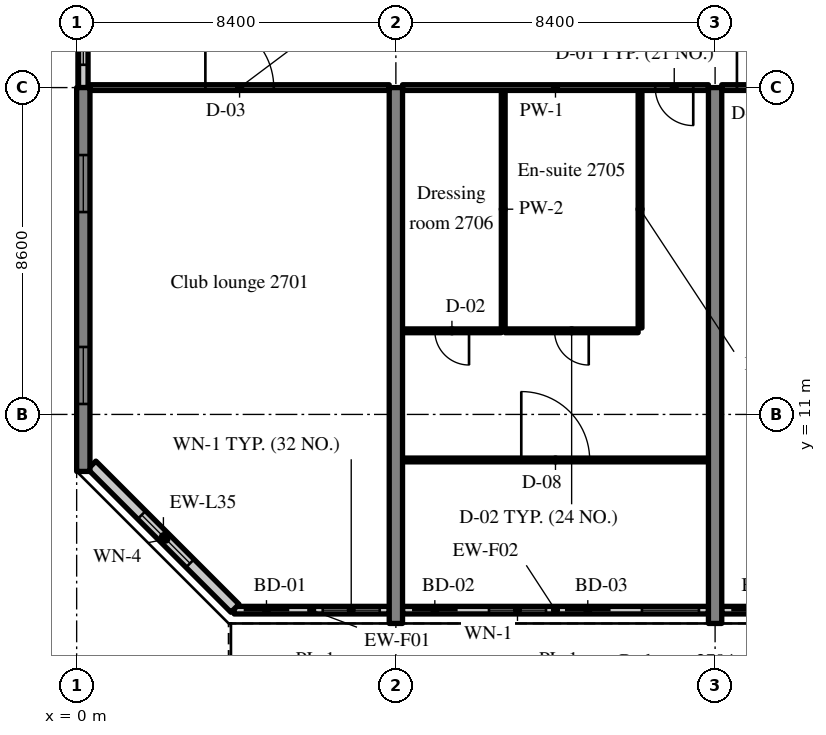
"""IFC4 building model, lengths in metres.
Left out: names, types, materials, properties, quantities, classifications, styles, units other than length and angle.
Written with IfcOpenShell. Run it as: python <this file> out.ifc"""

import sys

from ifc_helpers import new_model, si_unit, direction, frame, frame_2d, origin, place, context, subcontext, project, spatial, rectangle, extrude, source, transform, mapped, element, fill, save


model = new_model("IFC4")
c1 = context("Model", 3, precision=1e-05, world=origin(), true_north=direction((0.0, 1.0)))
c2 = subcontext(c1, "Body", "Model", "MODEL_VIEW")
j1 = project(units=[si_unit("LENGTHUNIT", "METRE"), si_unit("PLANEANGLEUNIT", "RADIAN")], contexts=[c1])
p1 = place(None, origin())
s1 = spatial("IfcSite", under=j1, at=p1, CompositionType="ELEMENT")
p2 = place(p1, origin())
s2 = spatial("IfcBuilding", under=s1, at=p2, CompositionType="ELEMENT")
p3 = place(p2, frame((0.0, 0.0, 114.2)))
s3 = spatial("IfcBuildingStorey", under=s2, at=p3, CompositionType="ELEMENT", Elevation=114.2)
m1 = source(origin(), c2, "Body", "SweptSolid", [
    extrude(rectangle(XDim=10.1, YDim=0.35, at=frame_2d((5.05, 0.0))), origin(), (0.0, 0.0, 1.0), 3.52),
])
p4 = place(p3, frame((0.175, 9.5, 0.0), z_axis=(0.0, 0.0, 1.0), x_axis=(0.0, 1.0, 0.0)))
e1 = element("IfcWall", 1, at=p4, inside=s3, PredefinedType="SHEAR", context=c2, shape_type="MappedRepresentation", body=[
    mapped(m1, transform((0.0, 0.0, 0.0), scale=1.0)),
])
m2 = source(origin(), c2, "Body", "SweptSolid", [
    extrude(rectangle(XDim=1.5, YDim=1.5, at=frame_2d((0.75, 0.75))), frame((0.0, 0.185, 0.0), z_axis=(0.0, -1.0, 0.0), x_axis=(1.0, 0.0, 0.0)), (0.0, 0.0, 1.0), 0.37),
])
p5 = place(p4, frame((1.775, 0.0, 0.9)))
e2 = element("IfcOpeningElement", 2, at=p5, cuts=e1, PredefinedType="OPENING", context=c2, shape_type="MappedRepresentation", body=[
    mapped(m2, transform((0.0, 0.0, 0.0), scale=1.0)),
])
p6 = place(p4, frame((6.825, 0.0, 0.9)))
e3 = element("IfcOpeningElement", 3, at=p6, cuts=e1, PredefinedType="OPENING", context=c2, shape_type="MappedRepresentation", body=[
    mapped(m2, transform((0.0, 0.0, 0.0), scale=1.0)),
])
m3 = source(origin(), c2, "Body", "SweptSolid", [
    extrude(rectangle(XDim=14.1, YDim=0.35, at=frame_2d((7.05, 0.0))), origin(), (0.0, 0.0, 1.0), 3.52),
])
for number, where, z_axis, x_axis in (
    (4, (8.4, 5.5, 0.0), (0.0, 0.0, 1.0), (0.0, 1.0, 0.0)),
    (5, (16.8, 5.5, 0.0), (0.0, 0.0, 1.0), (0.0, 1.0, 0.0)),
):
    element("IfcWall", number, at=place(p3, frame(where, z_axis=z_axis, x_axis=x_axis)), inside=s3, PredefinedType="SHEAR", context=c2, shape_type="MappedRepresentation", body=[
        mapped(m3, transform((0.0, 0.0, 0.0), scale=1.0)),
    ])
m4 = source(origin(), c2, "Body", "SweptSolid", [
    extrude(rectangle(XDim=4.08, YDim=0.2, at=frame_2d((2.04, 0.0))), origin(), (0.0, 0.0, 1.0), 2.82),
])
p7 = place(p3, frame((4.145, 5.85, 0.0), z_axis=(0.0, 0.0, 1.0), x_axis=(1.0, 0.0, 0.0)))
e6 = element("IfcWall", 6, at=p7, inside=s3, PredefinedType="SOLIDWALL", context=c2, shape_type="MappedRepresentation", body=[
    mapped(m4, transform((0.0, 0.0, 0.0), scale=1.0)),
])
m5 = source(origin(), c2, "Body", "SweptSolid", [
    extrude(rectangle(XDim=1.2, YDim=2.4, at=frame_2d((0.6, 1.2))), frame((0.0, 0.11, 0.0), z_axis=(0.0, -1.0, 0.0), x_axis=(1.0, 0.0, 0.0)), (0.0, 0.0, 1.0), 0.22),
])
p8 = place(p7, frame((0.25, 0.0, 0.0)))
e7 = element("IfcOpeningElement", 7, at=p8, cuts=e6, PredefinedType="OPENING", context=c2, shape_type="MappedRepresentation", body=[
    mapped(m5, transform((0.0, 0.0, 0.0), scale=1.0)),
])
m6 = source(origin(), c2, "Body", "SweptSolid", [
    extrude(rectangle(XDim=1.5, YDim=1.5, at=frame_2d((0.75, 0.75))), frame((0.0, 0.11, 0.0), z_axis=(0.0, -1.0, 0.0), x_axis=(1.0, 0.0, 0.0)), (0.0, 0.0, 1.0), 0.22),
])
p9 = place(p7, frame((2.33, 0.0, 0.9)))
e8 = element("IfcOpeningElement", 8, at=p9, cuts=e6, PredefinedType="OPENING", context=c2, shape_type="MappedRepresentation", body=[
    mapped(m6, transform((0.0, 0.0, 0.0), scale=1.0)),
])
m7 = source(origin(), c2, "Body", "SweptSolid", [
    extrude(rectangle(XDim=8.05, YDim=0.2, at=frame_2d((4.025, 0.0))), origin(), (0.0, 0.0, 1.0), 2.82),
])
p10 = place(p3, frame((8.575, 5.85, 0.0), z_axis=(0.0, 0.0, 1.0), x_axis=(1.0, 0.0, 0.0)))
e9 = element("IfcWall", 9, at=p10, inside=s3, PredefinedType="SOLIDWALL", context=c2, shape_type="MappedRepresentation", body=[
    mapped(m7, transform((0.0, 0.0, 0.0), scale=1.0)),
])
p11 = place(p10, frame((0.25, 0.0, 0.0)))
e10 = element("IfcOpeningElement", 10, at=p11, cuts=e9, PredefinedType="OPENING", context=c2, shape_type="MappedRepresentation", body=[
    mapped(m5, transform((0.0, 0.0, 0.0), scale=1.0)),
])
p12 = place(p10, frame((2.275, 0.0, 0.9)))
e11 = element("IfcOpeningElement", 11, at=p12, cuts=e9, PredefinedType="OPENING", context=c2, shape_type="MappedRepresentation", body=[
    mapped(m6, transform((0.0, 0.0, 0.0), scale=1.0)),
])
p13 = place(p10, frame((4.275, 0.0, 0.0)))
e12 = element("IfcOpeningElement", 12, at=p13, cuts=e9, PredefinedType="OPENING", context=c2, shape_type="MappedRepresentation", body=[
    mapped(m5, transform((0.0, 0.0, 0.0), scale=1.0)),
])
p14 = place(p10, frame((6.3, 0.0, 0.9)))
e13 = element("IfcOpeningElement", 13, at=p14, cuts=e9, PredefinedType="OPENING", context=c2, shape_type="MappedRepresentation", body=[
    mapped(m6, transform((0.0, 0.0, 0.0), scale=1.0)),
])
m8 = source(origin(), c2, "Body", "SweptSolid", [
    extrude(rectangle(XDim=8.05, YDim=0.2, at=frame_2d((4.025, 0.0))), origin(), (0.0, 0.0, 1.0), 2.82),
])
p15 = place(p3, frame((16.975, 5.85, 0.0), z_axis=(0.0, 0.0, 1.0), x_axis=(1.0, 0.0, 0.0)))
e14 = element("IfcWall", 14, at=p15, inside=s3, PredefinedType="SOLIDWALL", context=c2, shape_type="MappedRepresentation", body=[
    mapped(m8, transform((0.0, 0.0, 0.0), scale=1.0)),
])
p16 = place(p15, frame((0.25, 0.0, 0.0)))
e15 = element("IfcOpeningElement", 15, at=p16, cuts=e14, PredefinedType="OPENING", context=c2, shape_type="MappedRepresentation", body=[
    mapped(m5, transform((0.0, 0.0, 0.0), scale=1.0)),
])
p17 = place(p15, frame((2.275, 0.0, 0.9)))
e16 = element("IfcOpeningElement", 16, at=p17, cuts=e14, PredefinedType="OPENING", context=c2, shape_type="MappedRepresentation", body=[
    mapped(m6, transform((0.0, 0.0, 0.0), scale=1.0)),
])
p18 = place(p15, frame((4.275, 0.0, 0.0)))
e17 = element("IfcOpeningElement", 17, at=p18, cuts=e14, PredefinedType="OPENING", context=c2, shape_type="MappedRepresentation", body=[
    mapped(m5, transform((0.0, 0.0, 0.0), scale=1.0)),
])
p19 = place(p15, frame((6.3, 0.0, 0.9)))
e18 = element("IfcOpeningElement", 18, at=p19, cuts=e14, PredefinedType="OPENING", context=c2, shape_type="MappedRepresentation", body=[
    mapped(m6, transform((0.0, 0.0, 0.0), scale=1.0)),
])
m9 = source(origin(), c2, "Body", "SweptSolid", [
    extrude(rectangle(XDim=5.326, YDim=0.3, at=frame_2d((2.663, 0.0))), origin(), (0.0, 0.0, 1.0), 3.52),
])
p20 = place(p3, frame((0.4, 9.666, 0.0), z_axis=(0.0, 0.0, 1.0), x_axis=(0.707106781187, -0.707106781187, 0.0)))
e19 = element("IfcWall", 19, at=p20, inside=s3, PredefinedType="SOLIDWALL", context=c2, shape_type="MappedRepresentation", body=[
    mapped(m9, transform((0.0, 0.0, 0.0), scale=1.0)),
])
m10 = source(origin(), c2, "Body", "SweptSolid", [
    extrude(rectangle(XDim=1.8, YDim=1.5, at=frame_2d((0.9, 0.75))), frame((0.0, 0.16, 0.0), z_axis=(0.0, -1.0, 0.0), x_axis=(1.0, 0.0, 0.0)), (0.0, 0.0, 1.0), 0.32),
])
p21 = place(p20, frame((1.854, 0.0, 0.9)))
e20 = element("IfcOpeningElement", 20, at=p21, cuts=e19, PredefinedType="OPENING", context=c2, shape_type="MappedRepresentation", body=[
    mapped(m10, transform((0.0, 0.0, 0.0), scale=1.0)),
])
m11 = source(origin(), c2, "Body", "SweptSolid", [
    extrude(rectangle(XDim=2.4, YDim=0.25, at=frame_2d((1.2, 0.0))), origin(), (0.0, 0.0, 1.0), 2.62),
])
p22 = place(p3, frame((0.175, 19.6, 0.0), z_axis=(0.0, 0.0, 1.0), x_axis=(0.0, 1.0, 0.0)))
e21 = element("IfcWall", 21, at=p22, inside=s3, PredefinedType="SOLIDWALL", context=c2, shape_type="MappedRepresentation", body=[
    mapped(m11, transform((0.0, 0.0, 0.0), scale=1.0)),
])
m12 = source(origin(), c2, "Body", "SweptSolid", [
    extrude(rectangle(XDim=1.2, YDim=1.5, at=frame_2d((0.6, 0.75))), frame((0.0, 0.135, 0.0), z_axis=(0.0, -1.0, 0.0), x_axis=(1.0, 0.0, 0.0)), (0.0, 0.0, 1.0), 0.27),
])
p23 = place(p22, frame((0.6, 0.0, 0.9)))
e22 = element("IfcOpeningElement", 22, at=p23, cuts=e21, PredefinedType="OPENING", context=c2, shape_type="MappedRepresentation", body=[
    mapped(m12, transform((0.0, 0.0, 0.0), scale=1.0)),
])
m13 = source(origin(), c2, "Body", "SweptSolid", [
    extrude(rectangle(XDim=7.875, YDim=0.15, at=frame_2d((3.938, 0.0))), origin(), (0.0, 0.0, 1.0), 2.82),
])
p24 = place(p3, frame((0.35, 19.6, 0.0), z_axis=(0.0, 0.0, 1.0), x_axis=(1.0, 0.0, 0.0)))
e23 = element("IfcWall", 23, at=p24, inside=s3, PredefinedType="PARTITIONING", context=c2, shape_type="MappedRepresentation", body=[
    mapped(m13, transform((0.0, 0.0, 0.0), scale=1.0)),
])
m14 = source(origin(), c2, "Body", "SweptSolid", [
    extrude(rectangle(XDim=1.8, YDim=2.1, at=frame_2d((0.9, 1.05))), frame((0.0, 0.085, 0.0), z_axis=(0.0, -1.0, 0.0), x_axis=(1.0, 0.0, 0.0)), (0.0, 0.0, 1.0), 0.17),
])
p25 = place(p24, frame((3.037, 0.0, 0.0)))
e24 = element("IfcOpeningElement", 24, at=p25, cuts=e23, PredefinedType="OPENING", context=c2, shape_type="MappedRepresentation", body=[
    mapped(m14, transform((0.0, 0.0, 0.0), scale=1.0)),
])
m15 = source(origin(), c2, "Body", "SweptSolid", [
    extrude(rectangle(XDim=6.25, YDim=0.1, at=frame_2d((3.125, 0.0))), origin(), (0.0, 0.0, 1.0), 3.52),
])
for number, where, z_axis, x_axis in (
    (25, (14.825, 13.275, 0.0), (0.0, 0.0, 1.0), (0.0, 1.0, 0.0)),
    (26, (11.225, 13.275, 0.0), (0.0, 0.0, 1.0), (0.0, 1.0, 0.0)),
):
    element("IfcWall", number, at=place(p3, frame(where, z_axis=z_axis, x_axis=x_axis)), inside=s3, PredefinedType="PARTITIONING", context=c2, shape_type="MappedRepresentation", body=[
        mapped(m15, transform((0.0, 0.0, 0.0), scale=1.0)),
    ])
m16 = source(origin(), c2, "Body", "SweptSolid", [
    extrude(rectangle(XDim=3.5, YDim=0.1, at=frame_2d((1.75, 0.0))), origin(), (0.0, 0.0, 1.0), 3.52),
])
p26 = place(p3, frame((11.275, 13.2, 0.0), z_axis=(0.0, 0.0, 1.0), x_axis=(1.0, 0.0, 0.0)))
e27 = element("IfcWall", 27, at=p26, inside=s3, PredefinedType="PARTITIONING", context=c2, shape_type="MappedRepresentation", body=[
    mapped(m16, transform((0.0, 0.0, 0.0), scale=1.0)),
])
m17 = source(origin(), c2, "Body", "SweptSolid", [
    extrude(rectangle(XDim=0.9, YDim=2.1, at=frame_2d((0.45, 1.05))), frame((0.0, 0.06, 0.0), z_axis=(0.0, -1.0, 0.0), x_axis=(1.0, 0.0, 0.0)), (0.0, 0.0, 1.0), 0.12),
])
p27 = place(p26, frame((1.3, 0.0, 0.0)))
e28 = element("IfcOpeningElement", 28, at=p27, cuts=e27, PredefinedType="OPENING", context=c2, shape_type="MappedRepresentation", body=[
    mapped(m17, transform((0.0, 0.0, 0.0), scale=1.0)),
])
m18 = source(origin(), c2, "Body", "SweptSolid", [
    extrude(rectangle(XDim=2.6, YDim=0.1, at=frame_2d((1.3, 0.0))), origin(), (0.0, 0.0, 1.0), 3.52),
])
p28 = place(p3, frame((8.575, 13.2, 0.0), z_axis=(0.0, 0.0, 1.0), x_axis=(1.0, 0.0, 0.0)))
e29 = element("IfcWall", 29, at=p28, inside=s3, PredefinedType="PARTITIONING", context=c2, shape_type="MappedRepresentation", body=[
    mapped(m18, transform((0.0, 0.0, 0.0), scale=1.0)),
])
p29 = place(p28, frame((0.85, 0.0, 0.0)))
e30 = element("IfcOpeningElement", 30, at=p29, cuts=e29, PredefinedType="OPENING", context=c2, shape_type="MappedRepresentation", body=[
    mapped(m17, transform((0.0, 0.0, 0.0), scale=1.0)),
])
m19 = source(origin(), c2, "Body", "SweptSolid", [
    extrude(rectangle(XDim=8.05, YDim=0.1, at=frame_2d((4.025, 0.0))), origin(), (0.0, 0.0, 1.0), 3.52),
])
p30 = place(p3, frame((8.575, 9.802, 0.0), z_axis=(0.0, 0.0, 1.0), x_axis=(1.0, 0.0, 0.0)))
e31 = element("IfcWall", 31, at=p30, inside=s3, PredefinedType="PARTITIONING", context=c2, shape_type="MappedRepresentation", body=[
    mapped(m19, transform((0.0, 0.0, 0.0), scale=1.0)),
])
m20 = source(origin(), c2, "Body", "SweptSolid", [
    extrude(rectangle(XDim=1.8, YDim=2.1, at=frame_2d((0.9, 1.05))), frame((0.0, 0.06, 0.0), z_axis=(0.0, -1.0, 0.0), x_axis=(1.0, 0.0, 0.0)), (0.0, 0.0, 1.0), 0.12),
])
p31 = place(p30, frame((3.125, 0.0, 0.0)))
e32 = element("IfcOpeningElement", 32, at=p31, cuts=e31, PredefinedType="OPENING", context=c2, shape_type="MappedRepresentation", body=[
    mapped(m20, transform((0.0, 0.0, 0.0), scale=1.0)),
])
m21 = source(origin(), c2, "Body", "SweptSolid", [
    extrude(rectangle(XDim=8.05, YDim=0.15, at=frame_2d((4.025, 0.0))), origin(), (0.0, 0.0, 1.0), 2.82),
])
p32 = place(p3, frame((8.575, 19.6, 0.0), z_axis=(0.0, 0.0, 1.0), x_axis=(1.0, 0.0, 0.0)))
e33 = element("IfcWall", 33, at=p32, inside=s3, PredefinedType="PARTITIONING", context=c2, shape_type="MappedRepresentation", body=[
    mapped(m21, transform((0.0, 0.0, 0.0), scale=1.0)),
])
m22 = source(origin(), c2, "Body", "SweptSolid", [
    extrude(rectangle(XDim=1.0, YDim=2.1, at=frame_2d((0.5, 1.05))), frame((0.0, 0.085, 0.0), z_axis=(0.0, -1.0, 0.0), x_axis=(1.0, 0.0, 0.0)), (0.0, 0.0, 1.0), 0.17),
])
p33 = place(p32, frame((6.65, 0.0, 0.0)))
e34 = element("IfcOpeningElement", 34, at=p33, cuts=e33, PredefinedType="OPENING", context=c2, shape_type="MappedRepresentation", body=[
    mapped(m22, transform((0.0, 0.0, 0.0), scale=1.0)),
])
m23 = source(origin(), c2, "Body", "SweptSolid", [
    extrude(rectangle(XDim=8.05, YDim=0.15, at=frame_2d((4.025, 0.0))), origin(), (0.0, 0.0, 1.0), 2.82),
])
p34 = place(p3, frame((16.975, 19.6, 0.0), z_axis=(0.0, 0.0, 1.0), x_axis=(1.0, 0.0, 0.0)))
e35 = element("IfcWall", 35, at=p34, inside=s3, PredefinedType="PARTITIONING", context=c2, shape_type="MappedRepresentation", body=[
    mapped(m23, transform((0.0, 0.0, 0.0), scale=1.0)),
])
p35 = place(p34, frame((0.4, 0.0, 0.0)))
e36 = element("IfcOpeningElement", 36, at=p35, cuts=e35, PredefinedType="OPENING", context=c2, shape_type="MappedRepresentation", body=[
    mapped(m22, transform((0.0, 0.0, 0.0), scale=1.0)),
])
m24 = source(origin(), c2, "Body", "SweptSolid", [
    extrude(rectangle(XDim=1.2, YDim=2.4, at=frame_2d((0.6, 1.2))), frame((0.0, 0.025, 0.0), z_axis=(0.0, -1.0, 0.0), x_axis=(1.0, 0.0, 0.0)), (0.0, 0.0, 1.0), 0.05),
])
p36 = place(p8, origin())
e37 = element("IfcDoor", 37, at=p36, inside=s3, OperationType="SLIDING_TO_LEFT", PredefinedType="DOOR", context=c2, shape_type="MappedRepresentation", body=[
    mapped(m24, transform((0.0, 0.0, 0.0), scale=1.0)),
])
fill(e7, e37)
m25 = source(origin(), c2, "Body", "SweptSolid", [
    extrude(rectangle(XDim=1.5, YDim=1.5, at=frame_2d((0.75, 0.75))), frame((0.0, 0.03, 0.0), z_axis=(0.0, -1.0, 0.0), x_axis=(1.0, 0.0, 0.0)), (0.0, 0.0, 1.0), 0.06),
])
p37 = place(p9, origin())
e38 = element("IfcWindow", 38, at=p37, inside=s3, PartitioningType="SINGLE_PANEL", PredefinedType="WINDOW", context=c2, shape_type="MappedRepresentation", body=[
    mapped(m25, transform((0.0, 0.0, 0.0), scale=1.0)),
])
fill(e8, e38)
p38 = place(p11, origin())
e39 = element("IfcDoor", 39, at=p38, inside=s3, OperationType="SLIDING_TO_RIGHT", PredefinedType="DOOR", context=c2, shape_type="MappedRepresentation", body=[
    mapped(m24, transform((0.0, 0.0, 0.0), scale=1.0)),
])
fill(e10, e39)
p39 = place(p12, origin())
e40 = element("IfcWindow", 40, at=p39, inside=s3, PartitioningType="SINGLE_PANEL", PredefinedType="WINDOW", context=c2, shape_type="MappedRepresentation", body=[
    mapped(m25, transform((0.0, 0.0, 0.0), scale=1.0)),
])
fill(e11, e40)
p40 = place(p13, origin())
e41 = element("IfcDoor", 41, at=p40, inside=s3, OperationType="SLIDING_TO_LEFT", PredefinedType="DOOR", context=c2, shape_type="MappedRepresentation", body=[
    mapped(m24, transform((0.0, 0.0, 0.0), scale=1.0)),
])
fill(e12, e41)
p41 = place(p14, origin())
e42 = element("IfcWindow", 42, at=p41, inside=s3, PartitioningType="SINGLE_PANEL", PredefinedType="WINDOW", context=c2, shape_type="MappedRepresentation", body=[
    mapped(m25, transform((0.0, 0.0, 0.0), scale=1.0)),
])
fill(e13, e42)
p42 = place(p16, origin())
e43 = element("IfcDoor", 43, at=p42, inside=s3, OperationType="SLIDING_TO_RIGHT", PredefinedType="DOOR", context=c2, shape_type="MappedRepresentation", body=[
    mapped(m24, transform((0.0, 0.0, 0.0), scale=1.0)),
])
fill(e15, e43)
m26 = source(origin(), c2, "Body", "SweptSolid", [
    extrude(rectangle(XDim=1.8, YDim=1.5, at=frame_2d((0.9, 0.75))), frame((0.0, 0.03, 0.0), z_axis=(0.0, -1.0, 0.0), x_axis=(1.0, 0.0, 0.0)), (0.0, 0.0, 1.0), 0.06),
])
p43 = place(p21, origin())
e44 = element("IfcWindow", 44, at=p43, inside=s3, PartitioningType="SINGLE_PANEL", PredefinedType="WINDOW", context=c2, shape_type="MappedRepresentation", body=[
    mapped(m26, transform((0.0, 0.0, 0.0), scale=1.0)),
])
fill(e20, e44)
p44 = place(p5, origin())
e45 = element("IfcWindow", 45, at=p44, inside=s3, PartitioningType="SINGLE_PANEL", PredefinedType="WINDOW", context=c2, shape_type="MappedRepresentation", body=[
    mapped(m25, transform((0.0, 0.0, 0.0), scale=1.0)),
])
fill(e2, e45)
p45 = place(p6, origin())
e46 = element("IfcWindow", 46, at=p45, inside=s3, PartitioningType="SINGLE_PANEL", PredefinedType="WINDOW", context=c2, shape_type="MappedRepresentation", body=[
    mapped(m25, transform((0.0, 0.0, 0.0), scale=1.0)),
])
fill(e3, e46)
m27 = source(origin(), c2, "Body", "SweptSolid", [
    extrude(rectangle(XDim=1.2, YDim=1.5, at=frame_2d((0.6, 0.75))), frame((0.0, 0.03, 0.0), z_axis=(0.0, -1.0, 0.0), x_axis=(1.0, 0.0, 0.0)), (0.0, 0.0, 1.0), 0.06),
])
p46 = place(p23, origin())
e47 = element("IfcWindow", 47, at=p46, inside=s3, PartitioningType="SINGLE_PANEL", PredefinedType="WINDOW", context=c2, shape_type="MappedRepresentation", body=[
    mapped(m27, transform((0.0, 0.0, 0.0), scale=1.0)),
])
fill(e22, e47)
m28 = source(origin(), c2, "Body", "SweptSolid", [
    extrude(rectangle(XDim=1.8, YDim=2.1, at=frame_2d((0.9, 1.05))), frame((0.0, 0.025, 0.0), z_axis=(0.0, -1.0, 0.0), x_axis=(1.0, 0.0, 0.0)), (0.0, 0.0, 1.0), 0.05),
])
p47 = place(p25, origin())
e48 = element("IfcDoor", 48, at=p47, inside=s3, OperationType="DOUBLE_DOOR_SINGLE_SWING", PredefinedType="DOOR", context=c2, shape_type="MappedRepresentation", body=[
    mapped(m28, transform((0.0, 0.0, 0.0), scale=1.0)),
])
fill(e24, e48)
m29 = source(origin(), c2, "Body", "SweptSolid", [
    extrude(rectangle(XDim=0.9, YDim=2.1, at=frame_2d((0.45, 1.05))), frame((0.0, 0.025, 0.0), z_axis=(0.0, -1.0, 0.0), x_axis=(1.0, 0.0, 0.0)), (0.0, 0.0, 1.0), 0.05),
])
p48 = place(p27, origin())
e49 = element("IfcDoor", 49, at=p48, inside=s3, OperationType="SINGLE_SWING_RIGHT", PredefinedType="DOOR", context=c2, shape_type="MappedRepresentation", body=[
    mapped(m29, transform((0.0, 0.0, 0.0), scale=1.0)),
])
fill(e28, e49)
p49 = place(p29, origin())
e50 = element("IfcDoor", 50, at=p49, inside=s3, OperationType="SINGLE_SWING_RIGHT", PredefinedType="DOOR", context=c2, shape_type="MappedRepresentation", body=[
    mapped(m29, transform((0.0, 0.0, 0.0), scale=1.0)),
])
fill(e30, e50)
p50 = place(p31, origin())
e51 = element("IfcDoor", 51, at=p50, inside=s3, OperationType="DOUBLE_DOOR_SINGLE_SWING", PredefinedType="DOOR", context=c2, shape_type="MappedRepresentation", body=[
    mapped(m28, transform((0.0, 0.0, 0.0), scale=1.0)),
])
fill(e32, e51)
m30 = source(origin(), c2, "Body", "SweptSolid", [
    extrude(rectangle(XDim=1.0, YDim=2.1, at=frame_2d((0.5, 1.05))), frame((0.0, 0.025, 0.0), z_axis=(0.0, -1.0, 0.0), x_axis=(1.0, 0.0, 0.0)), (0.0, 0.0, 1.0), 0.05),
])
p51 = place(p33, origin())
e52 = element("IfcDoor", 52, at=p51, inside=s3, OperationType="SINGLE_SWING_RIGHT", PredefinedType="DOOR", context=c2, shape_type="MappedRepresentation", body=[
    mapped(m30, transform((0.0, 0.0, 0.0), scale=1.0)),
])
fill(e34, e52)
p52 = place(p35, origin())
e53 = element("IfcDoor", 53, at=p52, inside=s3, OperationType="SINGLE_SWING_LEFT", PredefinedType="DOOR", context=c2, shape_type="MappedRepresentation", body=[
    mapped(m30, transform((0.0, 0.0, 0.0), scale=1.0)),
])
fill(e36, e53)
save(model, sys.argv[1])
